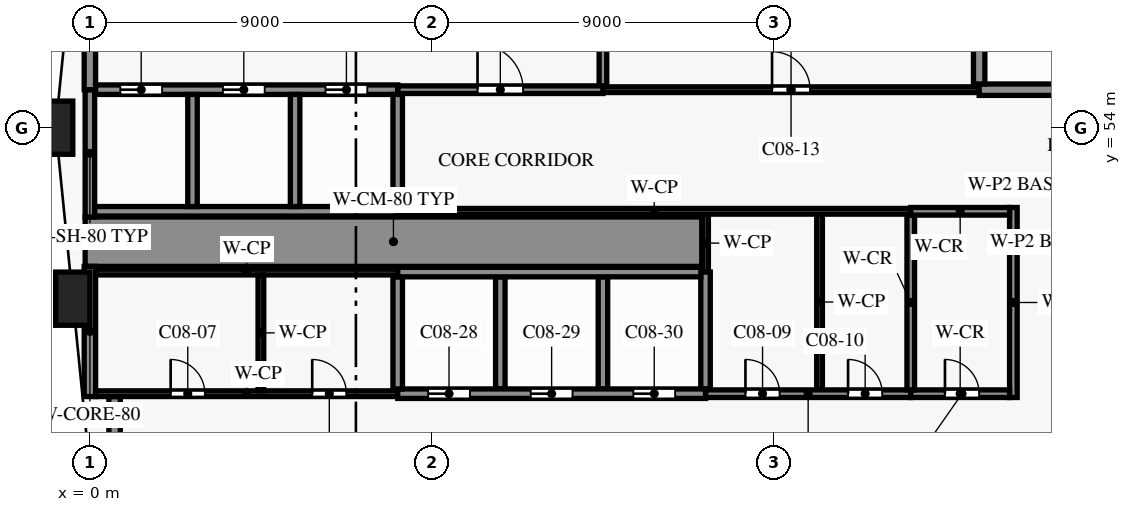
"""IFC4 building model, lengths in metres.
Left out: names, types, materials, properties, quantities, classifications, styles, units other than length and angle.
Written with IfcOpenShell. Run it as: python <this file> out.ifc"""

import sys

from ifc_helpers import new_model, si_unit, direction, frame, frame_2d, origin, origin_2d, place, context, subcontext, project, spatial, rectangle, extrude, element, fill, save


model = new_model("IFC4")
c1 = context("Model", 3, precision=1e-05, world=origin(), true_north=direction((0.0, 1.0)))
c2 = subcontext(c1, "Body", "Model", "MODEL_VIEW")
j1 = project(units=[si_unit("LENGTHUNIT", "METRE"), si_unit("PLANEANGLEUNIT", "RADIAN")], contexts=[c1])
p1 = place(None, origin())
s1 = spatial("IfcSite", under=j1, at=p1, CompositionType="ELEMENT")
p2 = place(p1, origin())
s2 = spatial("IfcBuilding", under=s1, at=p2, CompositionType="ELEMENT")
p3 = place(p2, frame((0.0, 0.0, 37.5)))
s3 = spatial("IfcBuildingStorey", under=s2, at=p3, CompositionType="ELEMENT", Elevation=37.5)
for number, where, z_axis, x_axis in (
    (1, (-0.9, 54.0, 0.0), (0.0, 0.0, 1.0), (0.0, -1.0, 0.0)),
    (2, (-0.45, 49.5, 0.0), (0.0, 0.0, 1.0), (0.1, -0.995, 0.0)),
):
    element("IfcColumn", number, at=place(p3, frame(where, z_axis=z_axis, x_axis=x_axis)), inside=s3, PredefinedType="COLUMN", context=c2, shape_type="SweptSolid", body=[
        extrude(rectangle(XDim=0.9, YDim=1.4, at=origin_2d()), origin(), (0.0, 0.0, 1.0), 3.6),
    ])
p4 = place(p3, frame((16.2, 47.0, 0.0), z_axis=(0.0, 0.0, 1.0), x_axis=(1.0, 0.0, 0.0)))
e3 = element("IfcWall", 3, at=p4, inside=s3, PredefinedType="PARTITIONING", context=c2, shape_type="SweptSolid", body=[
    extrude(rectangle(XDim=5.4, YDim=0.2, at=frame_2d((2.7, 0.0))), origin(), (0.0, 0.0, 1.0), 3.3),
])
p5 = place(p4, frame((1.05, 0.0, 0.0)))
e4 = element("IfcOpeningElement", 4, at=p5, cuts=e3, PredefinedType="OPENING", context=c2, shape_type="SweptSolid", body=[
    extrude(rectangle(XDim=0.9, YDim=2.1, at=frame_2d((0.45, 1.05))), frame((0.0, 0.11, 0.0), z_axis=(0.0, -1.0, 0.0), x_axis=(1.0, 0.0, 0.0)), (0.0, 0.0, 1.0), 0.22),
])
p6 = place(p4, frame((3.75, 0.0, 0.0)))
e5 = element("IfcOpeningElement", 5, at=p6, cuts=e3, PredefinedType="OPENING", context=c2, shape_type="SweptSolid", body=[
    extrude(rectangle(XDim=0.9, YDim=2.1, at=frame_2d((0.45, 1.05))), frame((0.0, 0.11, 0.0), z_axis=(0.0, -1.0, 0.0), x_axis=(1.0, 0.0, 0.0)), (0.0, 0.0, 1.0), 0.22),
])
p7 = place(p3, frame((0.15, 47.0, 0.0), z_axis=(0.0, 0.0, 1.0), x_axis=(1.0, 0.0, 0.0)))
e6 = element("IfcWall", 6, at=p7, inside=s3, PredefinedType="PARTITIONING", context=c2, shape_type="SweptSolid", body=[
    extrude(rectangle(XDim=7.95, YDim=0.15, at=frame_2d((3.975, 0.0))), origin(), (0.0, 0.0, 1.0), 3.3),
])
p8 = place(p7, frame((1.975, 0.0, 0.0)))
e7 = element("IfcOpeningElement", 7, at=p8, cuts=e6, PredefinedType="OPENING", context=c2, shape_type="SweptSolid", body=[
    extrude(rectangle(XDim=0.9, YDim=2.1, at=frame_2d((0.45, 1.05))), frame((0.0, 0.085, 0.0), z_axis=(0.0, -1.0, 0.0), x_axis=(1.0, 0.0, 0.0)), (0.0, 0.0, 1.0), 0.17),
])
p9 = place(p7, frame((5.7, 0.0, 0.0)))
e8 = element("IfcOpeningElement", 8, at=p9, cuts=e6, PredefinedType="OPENING", context=c2, shape_type="SweptSolid", body=[
    extrude(rectangle(XDim=0.9, YDim=2.1, at=frame_2d((0.45, 1.05))), frame((0.0, 0.085, 0.0), z_axis=(0.0, -1.0, 0.0), x_axis=(1.0, 0.0, 0.0)), (0.0, 0.0, 1.0), 0.17),
])
p10 = place(p3, frame((21.6, 47.0, 0.0), z_axis=(0.0, 0.0, 1.0), x_axis=(1.0, 0.0, 0.0)))
e9 = element("IfcWall", 9, at=p10, inside=s3, PredefinedType="PARTITIONING", context=c2, shape_type="SweptSolid", body=[
    extrude(rectangle(XDim=2.6, YDim=0.2, at=frame_2d((1.3, 0.0))), origin(), (0.0, 0.0, 1.0), 3.3),
])
p11 = place(p10, frame((0.9, 0.0, 0.0)))
e10 = element("IfcOpeningElement", 10, at=p11, cuts=e9, PredefinedType="OPENING", context=c2, shape_type="SweptSolid", body=[
    extrude(rectangle(XDim=0.9, YDim=2.1, at=frame_2d((0.45, 1.05))), frame((0.0, 0.11, 0.0), z_axis=(0.0, -1.0, 0.0), x_axis=(1.0, 0.0, 0.0)), (0.0, 0.0, 1.0), 0.22),
])
p12 = place(p3, frame((8.1, 47.0, 0.0), z_axis=(0.0, 0.0, 1.0), x_axis=(1.0, 0.0, 0.0)))
e11 = element("IfcWall", 11, at=p12, inside=s3, PredefinedType="SHEAR", context=c2, shape_type="SweptSolid", body=[
    extrude(rectangle(XDim=8.1, YDim=0.25, at=frame_2d((4.05, 0.0))), origin(), (0.0, 0.0, 1.0), 3.3),
])
p13 = place(p12, frame((0.8, 0.0, 0.0)))
e12 = element("IfcOpeningElement", 12, at=p13, cuts=e11, PredefinedType="OPENING", context=c2, shape_type="SweptSolid", body=[
    extrude(rectangle(XDim=1.1, YDim=2.1, at=frame_2d((0.55, 1.05))), frame((0.0, 0.135, 0.0), z_axis=(0.0, -1.0, 0.0), x_axis=(1.0, 0.0, 0.0)), (0.0, 0.0, 1.0), 0.27),
])
p14 = place(p12, frame((3.5, 0.0, 0.0)))
e13 = element("IfcOpeningElement", 13, at=p14, cuts=e11, PredefinedType="OPENING", context=c2, shape_type="SweptSolid", body=[
    extrude(rectangle(XDim=1.1, YDim=2.1, at=frame_2d((0.55, 1.05))), frame((0.0, 0.135, 0.0), z_axis=(0.0, -1.0, 0.0), x_axis=(1.0, 0.0, 0.0)), (0.0, 0.0, 1.0), 0.27),
])
p15 = place(p12, frame((6.2, 0.0, 0.0)))
e14 = element("IfcOpeningElement", 14, at=p15, cuts=e11, PredefinedType="OPENING", context=c2, shape_type="SweptSolid", body=[
    extrude(rectangle(XDim=1.1, YDim=2.1, at=frame_2d((0.55, 1.05))), frame((0.0, 0.135, 0.0), z_axis=(0.0, -1.0, 0.0), x_axis=(1.0, 0.0, 0.0)), (0.0, 0.0, 1.0), 0.27),
])
p16 = place(p3, frame((0.15, 50.2, 0.0), z_axis=(0.0, 0.0, 1.0), x_axis=(1.0, 0.0, 0.0)))
e15 = element("IfcWall", 15, at=p16, inside=s3, PredefinedType="PARTITIONING", context=c2, shape_type="SweptSolid", body=[
    extrude(rectangle(XDim=7.95, YDim=0.15, at=frame_2d((3.975, 0.0))), origin(), (0.0, 0.0, 1.0), 3.3),
])
p17 = place(p3, frame((8.1, 50.2, 0.0), z_axis=(0.0, 0.0, 1.0), x_axis=(1.0, 0.0, 0.0)))
e16 = element("IfcWall", 16, at=p17, inside=s3, PredefinedType="SHEAR", context=c2, shape_type="SweptSolid", body=[
    extrude(rectangle(XDim=7.975, YDim=0.25, at=frame_2d((3.987, 0.0))), origin(), (0.0, 0.0, 1.0), 3.3),
])
p18 = place(p3, frame((-0.125, 51.0, 0.0), z_axis=(0.0, 0.0, 1.0), x_axis=(1.0, 0.0, 0.0)))
e17 = element("IfcWall", 17, at=p18, inside=s3, PredefinedType="SHEAR", context=c2, shape_type="SweptSolid", body=[
    extrude(rectangle(XDim=16.225, YDim=1.3, at=frame_2d((8.113, 0.0))), origin(), (0.0, 0.0, 1.0), 3.3),
])
p19 = place(p3, frame((8.1, 51.8, 0.0), z_axis=(0.0, 0.0, 1.0), x_axis=(1.0, 0.0, 0.0)))
e18 = element("IfcWall", 18, at=p19, inside=s3, PredefinedType="PARTITIONING", context=c2, shape_type="SweptSolid", body=[
    extrude(rectangle(XDim=13.5, YDim=0.15, at=frame_2d((6.75, 0.0))), origin(), (0.0, 0.0, 1.0), 3.3),
])
p20 = place(p3, frame((21.6, 51.8, 0.0), z_axis=(0.0, 0.0, 1.0), x_axis=(1.0, 0.0, 0.0)))
e19 = element("IfcWall", 19, at=p20, inside=s3, PredefinedType="PARTITIONING", context=c2, shape_type="SweptSolid", body=[
    extrude(rectangle(XDim=2.6, YDim=0.2, at=frame_2d((1.3, 0.0))), origin(), (0.0, 0.0, 1.0), 3.3),
])
p21 = place(p3, frame((0.125, 51.8, 0.0), z_axis=(0.0, 0.0, 1.0), x_axis=(1.0, 0.0, 0.0)))
e20 = element("IfcWall", 20, at=p21, inside=s3, PredefinedType="SHEAR", context=c2, shape_type="SweptSolid", body=[
    extrude(rectangle(XDim=7.975, YDim=0.25, at=frame_2d((3.988, 0.0))), origin(), (0.0, 0.0, 1.0), 3.3),
])
p22 = place(p3, frame((8.1, 55.0, 0.0), z_axis=(0.0, 0.0, 1.0), x_axis=(1.0, 0.0, 0.0)))
e21 = element("IfcWall", 21, at=p22, inside=s3, PredefinedType="PARTITIONING", context=c2, shape_type="SweptSolid", body=[
    extrude(rectangle(XDim=5.4, YDim=0.2, at=frame_2d((2.7, 0.0))), origin(), (0.0, 0.0, 1.0), 3.3),
])
p23 = place(p22, frame((2.1, 0.0, 0.0)))
e22 = element("IfcOpeningElement", 22, at=p23, cuts=e21, PredefinedType="OPENING", context=c2, shape_type="SweptSolid", body=[
    extrude(rectangle(XDim=1.2, YDim=2.2, at=frame_2d((0.6, 1.1))), frame((0.0, 0.11, 0.0), z_axis=(0.0, -1.0, 0.0), x_axis=(1.0, 0.0, 0.0)), (0.0, 0.0, 1.0), 0.22),
])
p24 = place(p3, frame((13.5, 55.0, 0.0), z_axis=(0.0, 0.0, 1.0), x_axis=(1.0, 0.0, 0.0)))
e23 = element("IfcWall", 23, at=p24, inside=s3, PredefinedType="PARTITIONING", context=c2, shape_type="SweptSolid", body=[
    extrude(rectangle(XDim=9.9, YDim=0.15, at=frame_2d((4.95, 0.0))), origin(), (0.0, 0.0, 1.0), 3.3),
])
p25 = place(p24, frame((4.45, 0.0, 0.0)))
e24 = element("IfcOpeningElement", 24, at=p25, cuts=e23, PredefinedType="OPENING", context=c2, shape_type="SweptSolid", body=[
    extrude(rectangle(XDim=1.0, YDim=2.1, at=frame_2d((0.5, 1.05))), frame((0.0, 0.085, 0.0), z_axis=(0.0, -1.0, 0.0), x_axis=(1.0, 0.0, 0.0)), (0.0, 0.0, 1.0), 0.17),
])
p26 = place(p3, frame((0.15, 55.0, 0.0), z_axis=(0.0, 0.0, 1.0), x_axis=(1.0, 0.0, 0.0)))
e25 = element("IfcWall", 25, at=p26, inside=s3, PredefinedType="SHEAR", context=c2, shape_type="SweptSolid", body=[
    extrude(rectangle(XDim=7.95, YDim=0.25, at=frame_2d((3.975, 0.0))), origin(), (0.0, 0.0, 1.0), 3.3),
])
p27 = place(p26, frame((0.65, 0.0, 0.0)))
e26 = element("IfcOpeningElement", 26, at=p27, cuts=e25, PredefinedType="OPENING", context=c2, shape_type="SweptSolid", body=[
    extrude(rectangle(XDim=1.1, YDim=2.1, at=frame_2d((0.55, 1.05))), frame((0.0, 0.135, 0.0), z_axis=(0.0, -1.0, 0.0), x_axis=(1.0, 0.0, 0.0)), (0.0, 0.0, 1.0), 0.27),
])
p28 = place(p26, frame((3.35, 0.0, 0.0)))
e27 = element("IfcOpeningElement", 27, at=p28, cuts=e25, PredefinedType="OPENING", context=c2, shape_type="SweptSolid", body=[
    extrude(rectangle(XDim=1.1, YDim=2.1, at=frame_2d((0.55, 1.05))), frame((0.0, 0.135, 0.0), z_axis=(0.0, -1.0, 0.0), x_axis=(1.0, 0.0, 0.0)), (0.0, 0.0, 1.0), 0.27),
])
p29 = place(p26, frame((6.05, 0.0, 0.0)))
e28 = element("IfcOpeningElement", 28, at=p29, cuts=e25, PredefinedType="OPENING", context=c2, shape_type="SweptSolid", body=[
    extrude(rectangle(XDim=1.1, YDim=2.1, at=frame_2d((0.55, 1.05))), frame((0.0, 0.135, 0.0), z_axis=(0.0, -1.0, 0.0), x_axis=(1.0, 0.0, 0.0)), (0.0, 0.0, 1.0), 0.27),
])
p30 = place(p3, frame((23.4, 55.0, 0.0), z_axis=(0.0, 0.0, 1.0), x_axis=(1.0, 0.0, 0.0)))
e29 = element("IfcWall", 29, at=p30, inside=s3, PredefinedType="SHEAR", context=c2, shape_type="SweptSolid", body=[
    extrude(rectangle(XDim=3.45, YDim=0.3, at=frame_2d((1.725, 0.0))), origin(), (0.0, 0.0, 1.0), 3.3),
])
p31 = place(p3, frame((0.0, 46.925, 0.0), z_axis=(0.0, 0.0, 1.0), x_axis=(0.0, 1.0, 0.0)))
e30 = element("IfcWall", 30, at=p31, inside=s3, PredefinedType="SHEAR", context=c2, shape_type="SweptSolid", body=[
    extrude(rectangle(XDim=3.425, YDim=0.3, at=frame_2d((1.712, 0.0))), origin(), (0.0, 0.0, 1.0), 3.3),
])
p32 = place(p3, frame((0.0, 55.0, 0.0), z_axis=(0.0, 0.0, 1.0), x_axis=(0.0, 1.0, 0.0)))
e31 = element("IfcWall", 31, at=p32, inside=s3, PredefinedType="SHEAR", context=c2, shape_type="SweptSolid", body=[
    extrude(rectangle(XDim=3.0, YDim=0.3, at=frame_2d((1.5, 0.0))), origin(), (0.0, 0.0, 1.0), 3.3),
])
p33 = place(p3, frame((0.0, 51.65, 0.0), z_axis=(0.0, 0.0, 1.0), x_axis=(0.0, 1.0, 0.0)))
e32 = element("IfcWall", 32, at=p33, inside=s3, PredefinedType="SHEAR", context=c2, shape_type="SweptSolid", body=[
    extrude(rectangle(XDim=3.35, YDim=0.25, at=frame_2d((1.675, 0.0))), origin(), (0.0, 0.0, 1.0), 3.3),
])
p34 = place(p3, frame((0.65, 43.275, 0.0), z_axis=(0.0, 0.0, 1.0), x_axis=(0.0, 1.0, 0.0)))
e33 = element("IfcWall", 33, at=p34, inside=s3, PredefinedType="SHEAR", context=c2, shape_type="SweptSolid", body=[
    extrude(rectangle(XDim=3.65, YDim=0.3, at=frame_2d((1.825, 0.0))), origin(), (0.0, 0.0, 1.0), 3.3),
])
p35 = place(p3, frame((2.7, 51.925, 0.0), z_axis=(0.0, 0.0, 1.0), x_axis=(0.0, 1.0, 0.0)))
e34 = element("IfcWall", 34, at=p35, inside=s3, PredefinedType="SHEAR", context=c2, shape_type="SweptSolid", body=[
    extrude(rectangle(XDim=2.95, YDim=0.25, at=frame_2d((1.475, 0.0))), origin(), (0.0, 0.0, 1.0), 3.3),
])
p36 = place(p3, frame((4.5, 47.075, 0.0), z_axis=(0.0, 0.0, 1.0), x_axis=(0.0, 1.0, 0.0)))
e35 = element("IfcWall", 35, at=p36, inside=s3, PredefinedType="PARTITIONING", context=c2, shape_type="SweptSolid", body=[
    extrude(rectangle(XDim=3.05, YDim=0.15, at=frame_2d((1.525, 0.0))), origin(), (0.0, 0.0, 1.0), 3.3),
])
for number, where, z_axis, x_axis in (
    (36, (5.4, 51.925, 0.0), (0.0, 0.0, 1.0), (0.0, 1.0, 0.0)),
    (37, (8.1, 47.125, 0.0), (0.0, 0.0, 1.0), (0.0, 1.0, 0.0)),
    (38, (8.1, 51.925, 0.0), (0.0, 0.0, 1.0), (0.0, 1.0, 0.0)),
    (39, (10.8, 47.125, 0.0), (0.0, 0.0, 1.0), (0.0, 1.0, 0.0)),
):
    element("IfcWall", number, at=place(p3, frame(where, z_axis=z_axis, x_axis=x_axis)), inside=s3, PredefinedType="SHEAR", context=c2, shape_type="SweptSolid", body=[
        extrude(rectangle(XDim=2.95, YDim=0.25, at=frame_2d((1.475, 0.0))), origin(), (0.0, 0.0, 1.0), 3.3),
    ])
p37 = place(p3, frame((13.5, 55.1, 0.0), z_axis=(0.0, 0.0, 1.0), x_axis=(0.0, 1.0, 0.0)))
e40 = element("IfcWall", 40, at=p37, inside=s3, PredefinedType="PARTITIONING", context=c2, shape_type="SweptSolid", body=[
    extrude(rectangle(XDim=3.9, YDim=0.2, at=frame_2d((1.95, 0.0))), origin(), (0.0, 0.0, 1.0), 3.3),
])
p38 = place(p3, frame((13.5, 47.125, 0.0), z_axis=(0.0, 0.0, 1.0), x_axis=(0.0, 1.0, 0.0)))
e41 = element("IfcWall", 41, at=p38, inside=s3, PredefinedType="SHEAR", context=c2, shape_type="SweptSolid", body=[
    extrude(rectangle(XDim=2.95, YDim=0.25, at=frame_2d((1.475, 0.0))), origin(), (0.0, 0.0, 1.0), 3.3),
])
p39 = place(p3, frame((16.2, 50.2, 0.0), z_axis=(0.0, 0.0, 1.0), x_axis=(0.0, 1.0, 0.0)))
e42 = element("IfcWall", 42, at=p39, inside=s3, PredefinedType="PARTITIONING", context=c2, shape_type="SweptSolid", body=[
    extrude(rectangle(XDim=1.525, YDim=0.15, at=frame_2d((0.763, 0.0))), origin(), (0.0, 0.0, 1.0), 3.3),
])
p40 = place(p3, frame((16.2, 47.125, 0.0), z_axis=(0.0, 0.0, 1.0), x_axis=(0.0, 1.0, 0.0)))
e43 = element("IfcWall", 43, at=p40, inside=s3, PredefinedType="SHEAR", context=c2, shape_type="SweptSolid", body=[
    extrude(rectangle(XDim=3.075, YDim=0.25, at=frame_2d((1.538, 0.0))), origin(), (0.0, 0.0, 1.0), 3.3),
])
p41 = place(p3, frame((19.2, 47.1, 0.0), z_axis=(0.0, 0.0, 1.0), x_axis=(0.0, 1.0, 0.0)))
e44 = element("IfcWall", 44, at=p41, inside=s3, PredefinedType="PARTITIONING", context=c2, shape_type="SweptSolid", body=[
    extrude(rectangle(XDim=4.625, YDim=0.15, at=frame_2d((2.312, 0.0))), origin(), (0.0, 0.0, 1.0), 3.3),
])
p42 = place(p3, frame((21.6, 47.1, 0.0), z_axis=(0.0, 0.0, 1.0), x_axis=(0.0, 1.0, 0.0)))
e45 = element("IfcWall", 45, at=p42, inside=s3, PredefinedType="PARTITIONING", context=c2, shape_type="SweptSolid", body=[
    extrude(rectangle(XDim=4.6, YDim=0.2, at=frame_2d((2.3, 0.0))), origin(), (0.0, 0.0, 1.0), 3.3),
])
p43 = place(p3, frame((23.4, 55.15, 0.0), z_axis=(0.0, 0.0, 1.0), x_axis=(0.0, 1.0, 0.0)))
e46 = element("IfcWall", 46, at=p43, inside=s3, PredefinedType="SHEAR", context=c2, shape_type="SweptSolid", body=[
    extrude(rectangle(XDim=8.0, YDim=0.3, at=frame_2d((4.0, 0.0))), origin(), (0.0, 0.0, 1.0), 3.3),
])
p44 = place(p3, frame((24.3, 46.9, 0.0), z_axis=(0.0, 0.0, 1.0), x_axis=(0.0, 1.0, 0.0)))
e47 = element("IfcWall", 47, at=p44, inside=s3, PredefinedType="SHEAR", context=c2, shape_type="SweptSolid", body=[
    extrude(rectangle(XDim=5.0, YDim=0.2, at=frame_2d((2.5, 0.0))), origin(), (0.0, 0.0, 1.0), 3.3),
])
p45 = place(p23, origin())
e48 = element("IfcDoor", 48, at=p45, inside=s3, OperationType="SINGLE_SWING_RIGHT", PredefinedType="DOOR", context=c2, shape_type="SweptSolid", body=[
    extrude(rectangle(XDim=1.2, YDim=2.2, at=frame_2d((0.6, 1.1))), frame((0.0, 0.025, 0.0), z_axis=(0.0, -1.0, 0.0), x_axis=(1.0, 0.0, 0.0)), (0.0, 0.0, 1.0), 0.05),
])
fill(e22, e48)
p46 = place(p11, origin())
e49 = element("IfcDoor", 49, at=p46, inside=s3, OperationType="SINGLE_SWING_LEFT", PredefinedType="DOOR", context=c2, shape_type="SweptSolid", body=[
    extrude(rectangle(XDim=0.9, YDim=2.1, at=frame_2d((0.45, 1.05))), frame((0.0, 0.025, 0.0), z_axis=(0.0, -1.0, 0.0), x_axis=(1.0, 0.0, 0.0)), (0.0, 0.0, 1.0), 0.05),
])
fill(e10, e49)
p47 = place(p8, origin())
e50 = element("IfcDoor", 50, at=p47, inside=s3, OperationType="SINGLE_SWING_RIGHT", PredefinedType="DOOR", context=c2, shape_type="SweptSolid", body=[
    extrude(rectangle(XDim=0.9, YDim=2.1, at=frame_2d((0.45, 1.05))), frame((0.0, 0.025, 0.0), z_axis=(0.0, -1.0, 0.0), x_axis=(1.0, 0.0, 0.0)), (0.0, 0.0, 1.0), 0.05),
])
fill(e7, e50)
p48 = place(p9, origin())
e51 = element("IfcDoor", 51, at=p48, inside=s3, OperationType="SINGLE_SWING_LEFT", PredefinedType="DOOR", context=c2, shape_type="SweptSolid", body=[
    extrude(rectangle(XDim=0.9, YDim=2.1, at=frame_2d((0.45, 1.05))), frame((0.0, 0.025, 0.0), z_axis=(0.0, -1.0, 0.0), x_axis=(1.0, 0.0, 0.0)), (0.0, 0.0, 1.0), 0.05),
])
fill(e8, e51)
p49 = place(p5, origin())
e52 = element("IfcDoor", 52, at=p49, inside=s3, OperationType="SINGLE_SWING_LEFT", PredefinedType="DOOR", context=c2, shape_type="SweptSolid", body=[
    extrude(rectangle(XDim=0.9, YDim=2.1, at=frame_2d((0.45, 1.05))), frame((0.0, 0.025, 0.0), z_axis=(0.0, -1.0, 0.0), x_axis=(1.0, 0.0, 0.0)), (0.0, 0.0, 1.0), 0.05),
])
fill(e4, e52)
p50 = place(p6, origin())
e53 = element("IfcDoor", 53, at=p50, inside=s3, OperationType="SINGLE_SWING_RIGHT", PredefinedType="DOOR", context=c2, shape_type="SweptSolid", body=[
    extrude(rectangle(XDim=0.9, YDim=2.1, at=frame_2d((0.45, 1.05))), frame((0.0, 0.025, 0.0), z_axis=(0.0, -1.0, 0.0), x_axis=(1.0, 0.0, 0.0)), (0.0, 0.0, 1.0), 0.05),
])
fill(e5, e53)
p51 = place(p25, origin())
e54 = element("IfcDoor", 54, at=p51, inside=s3, OperationType="SINGLE_SWING_LEFT", PredefinedType="DOOR", context=c2, shape_type="SweptSolid", body=[
    extrude(rectangle(XDim=1.0, YDim=2.1, at=frame_2d((0.5, 1.05))), frame((0.0, 0.025, 0.0), z_axis=(0.0, -1.0, 0.0), x_axis=(1.0, 0.0, 0.0)), (0.0, 0.0, 1.0), 0.05),
])
fill(e24, e54)
p52 = place(p27, origin())
e55 = element("IfcDoor", 55, at=p52, inside=s3, OperationType="DOUBLE_DOOR_SLIDING", PredefinedType="DOOR", context=c2, shape_type="SweptSolid", body=[
    extrude(rectangle(XDim=1.1, YDim=2.1, at=frame_2d((0.55, 1.05))), frame((0.0, 0.025, 0.0), z_axis=(0.0, -1.0, 0.0), x_axis=(1.0, 0.0, 0.0)), (0.0, 0.0, 1.0), 0.05),
])
fill(e26, e55)
p53 = place(p28, origin())
e56 = element("IfcDoor", 56, at=p53, inside=s3, OperationType="DOUBLE_DOOR_SLIDING", PredefinedType="DOOR", context=c2, shape_type="SweptSolid", body=[
    extrude(rectangle(XDim=1.1, YDim=2.1, at=frame_2d((0.55, 1.05))), frame((0.0, 0.025, 0.0), z_axis=(0.0, -1.0, 0.0), x_axis=(1.0, 0.0, 0.0)), (0.0, 0.0, 1.0), 0.05),
])
fill(e27, e56)
p54 = place(p29, origin())
e57 = element("IfcDoor", 57, at=p54, inside=s3, OperationType="DOUBLE_DOOR_SLIDING", PredefinedType="DOOR", context=c2, shape_type="SweptSolid", body=[
    extrude(rectangle(XDim=1.1, YDim=2.1, at=frame_2d((0.55, 1.05))), frame((0.0, 0.025, 0.0), z_axis=(0.0, -1.0, 0.0), x_axis=(1.0, 0.0, 0.0)), (0.0, 0.0, 1.0), 0.05),
])
fill(e28, e57)
p55 = place(p13, origin())
e58 = element("IfcDoor", 58, at=p55, inside=s3, OperationType="DOUBLE_DOOR_SLIDING", PredefinedType="DOOR", context=c2, shape_type="SweptSolid", body=[
    extrude(rectangle(XDim=1.1, YDim=2.1, at=frame_2d((0.55, 1.05))), frame((0.0, 0.025, 0.0), z_axis=(0.0, -1.0, 0.0), x_axis=(1.0, 0.0, 0.0)), (0.0, 0.0, 1.0), 0.05),
])
fill(e12, e58)
p56 = place(p14, origin())
e59 = element("IfcDoor", 59, at=p56, inside=s3, OperationType="DOUBLE_DOOR_SLIDING", PredefinedType="DOOR", context=c2, shape_type="SweptSolid", body=[
    extrude(rectangle(XDim=1.1, YDim=2.1, at=frame_2d((0.55, 1.05))), frame((0.0, 0.025, 0.0), z_axis=(0.0, -1.0, 0.0), x_axis=(1.0, 0.0, 0.0)), (0.0, 0.0, 1.0), 0.05),
])
fill(e13, e59)
p57 = place(p15, origin())
e60 = element("IfcDoor", 60, at=p57, inside=s3, OperationType="DOUBLE_DOOR_SLIDING", PredefinedType="DOOR", context=c2, shape_type="SweptSolid", body=[
    extrude(rectangle(XDim=1.1, YDim=2.1, at=frame_2d((0.55, 1.05))), frame((0.0, 0.025, 0.0), z_axis=(0.0, -1.0, 0.0), x_axis=(1.0, 0.0, 0.0)), (0.0, 0.0, 1.0), 0.05),
])
fill(e14, e60)
save(model, sys.argv[1])
